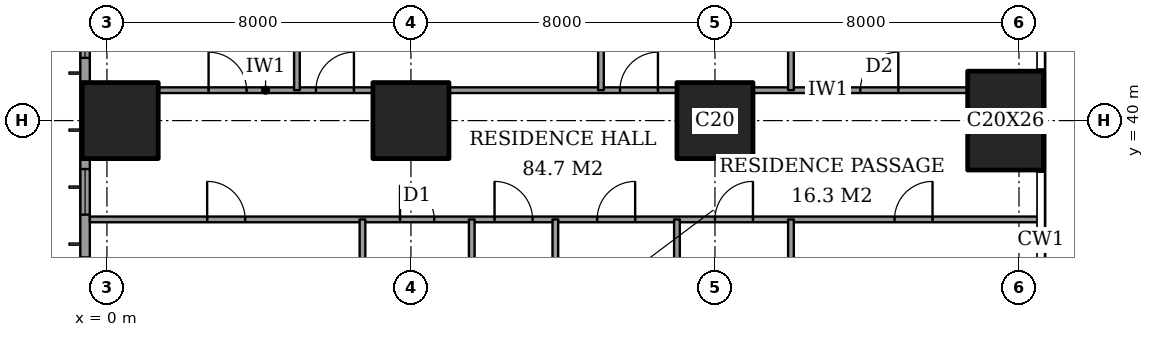
"""IFC4 building model, lengths in metres.
Left out: names, types, materials, properties, quantities, classifications, styles, units other than length and angle.
Written with IfcOpenShell. Run it as: python <this file> out.ifc"""

import sys

from ifc_helpers import new_model, si_unit, direction, frame, frame_2d, origin, origin_2d, place, context, subcontext, project, spatial, rectangle, extrude, element, fill, save


model = new_model("IFC4")
c1 = context("Model", 3, precision=1e-05, world=origin(), true_north=direction((0.0, 1.0)))
c2 = subcontext(c1, "Body", "Model", "MODEL_VIEW")
j1 = project(units=[si_unit("LENGTHUNIT", "METRE"), si_unit("PLANEANGLEUNIT", "RADIAN")], contexts=[c1])
p1 = place(None, origin())
s1 = spatial("IfcSite", under=j1, at=p1, CompositionType="ELEMENT")
p2 = place(p1, origin())
s2 = spatial("IfcBuilding", under=s1, at=p2, CompositionType="ELEMENT")
p3 = place(p2, frame((0.0, 0.0, 44.0)))
s3 = spatial("IfcBuildingStorey", under=s2, at=p3, CompositionType="ELEMENT", Elevation=44.0)
for number, where, z_axis, x_axis in (
    (1, (0.35, 40.0, 0.0), (0.0, 0.0, 1.0), (1.0, 0.0, 0.0)),
    (2, (8.0, 40.0, 0.0), (0.0, 0.0, 1.0), (1.0, 0.0, 0.0)),
    (3, (16.0, 40.0, 0.0), (0.0, 0.0, 1.0), (1.0, 0.0, 0.0)),
):
    element("IfcColumn", number, at=place(p3, frame(where, z_axis=z_axis, x_axis=x_axis)), inside=s3, PredefinedType="COLUMN", context=c2, shape_type="SweptSolid", body=[
        extrude(rectangle(XDim=2.0, YDim=2.0, at=origin_2d()), origin(), (0.0, 0.0, 1.0), 3.6),
    ])
p4 = place(p3, frame((23.65, 40.0, 0.0), z_axis=(0.0, 0.0, 1.0), x_axis=(1.0, 0.0, 0.0)))
e4 = element("IfcColumn", 4, at=p4, inside=s3, PredefinedType="COLUMN", context=c2, shape_type="SweptSolid", body=[
    extrude(rectangle(XDim=2.0, YDim=2.6, at=origin_2d()), origin(), (0.0, 0.0, 1.0), 3.6),
])
p5 = place(p3, frame((-0.575, 44.825, 0.0), z_axis=(0.0, 0.0, 1.0), x_axis=(0.0, -1.0, 0.0)))
e5 = element("IfcWall", 5, at=p5, inside=s3, PredefinedType="SOLIDWALL", context=c2, shape_type="SweptSolid", body=[
    extrude(rectangle(XDim=41.65, YDim=0.25, at=frame_2d((20.825, 0.0))), origin(), (0.0, 0.0, 1.0), 3.6),
])
p6 = place(p5, frame((0.775, 0.0, 0.6)))
e6 = element("IfcOpeningElement", 6, at=p6, cuts=e5, PredefinedType="OPENING", context=c2, shape_type="SweptSolid", body=[
    extrude(rectangle(XDim=2.4, YDim=2.0, at=frame_2d((1.2, 1.0))), frame((0.0, 0.135, 0.0), z_axis=(0.0, -1.0, 0.0), x_axis=(1.0, 0.0, 0.0)), (0.0, 0.0, 1.0), 0.27),
])
p7 = place(p5, frame((6.1, 0.0, 0.6)))
e7 = element("IfcOpeningElement", 7, at=p7, cuts=e5, PredefinedType="OPENING", context=c2, shape_type="SweptSolid", body=[
    extrude(rectangle(XDim=1.2, YDim=2.0, at=frame_2d((0.6, 1.0))), frame((0.0, 0.135, 0.0), z_axis=(0.0, -1.0, 0.0), x_axis=(1.0, 0.0, 0.0)), (0.0, 0.0, 1.0), 0.27),
])
p8 = place(p5, frame((8.425, 0.0, 0.6)))
e8 = element("IfcOpeningElement", 8, at=p8, cuts=e5, PredefinedType="OPENING", context=c2, shape_type="SweptSolid", body=[
    extrude(rectangle(XDim=2.4, YDim=2.0, at=frame_2d((1.2, 1.0))), frame((0.0, 0.135, 0.0), z_axis=(0.0, -1.0, 0.0), x_axis=(1.0, 0.0, 0.0)), (0.0, 0.0, 1.0), 0.27),
])
p9 = place(p5, frame((15.625, 0.0, 0.6)))
e9 = element("IfcOpeningElement", 9, at=p9, cuts=e5, PredefinedType="OPENING", context=c2, shape_type="SweptSolid", body=[
    extrude(rectangle(XDim=2.4, YDim=2.0, at=frame_2d((1.2, 1.0))), frame((0.0, 0.135, 0.0), z_axis=(0.0, -1.0, 0.0), x_axis=(1.0, 0.0, 0.0)), (0.0, 0.0, 1.0), 0.27),
])
p10 = place(p5, frame((23.625, 0.0, 0.6)))
e10 = element("IfcOpeningElement", 10, at=p10, cuts=e5, PredefinedType="OPENING", context=c2, shape_type="SweptSolid", body=[
    extrude(rectangle(XDim=2.4, YDim=2.0, at=frame_2d((1.2, 1.0))), frame((0.0, 0.135, 0.0), z_axis=(0.0, -1.0, 0.0), x_axis=(1.0, 0.0, 0.0)), (0.0, 0.0, 1.0), 0.27),
])
p11 = place(p5, frame((30.825, 0.0, 0.6)))
e11 = element("IfcOpeningElement", 11, at=p11, cuts=e5, PredefinedType="OPENING", context=c2, shape_type="SweptSolid", body=[
    extrude(rectangle(XDim=2.4, YDim=2.0, at=frame_2d((1.2, 1.0))), frame((0.0, 0.135, 0.0), z_axis=(0.0, -1.0, 0.0), x_axis=(1.0, 0.0, 0.0)), (0.0, 0.0, 1.0), 0.27),
])
p12 = place(p5, frame((34.5, 0.0, 0.6)))
e12 = element("IfcOpeningElement", 12, at=p12, cuts=e5, PredefinedType="OPENING", context=c2, shape_type="SweptSolid", body=[
    extrude(rectangle(XDim=1.2, YDim=2.0, at=frame_2d((0.6, 1.0))), frame((0.0, 0.135, 0.0), z_axis=(0.0, -1.0, 0.0), x_axis=(1.0, 0.0, 0.0)), (0.0, 0.0, 1.0), 0.27),
])
p13 = place(p5, frame((38.475, 0.0, 0.6)))
e13 = element("IfcOpeningElement", 13, at=p13, cuts=e5, PredefinedType="OPENING", context=c2, shape_type="SweptSolid", body=[
    extrude(rectangle(XDim=2.4, YDim=2.0, at=frame_2d((1.2, 1.0))), frame((0.0, 0.135, 0.0), z_axis=(0.0, -1.0, 0.0), x_axis=(1.0, 0.0, 0.0)), (0.0, 0.0, 1.0), 0.27),
])
p14 = place(p3, frame((-0.45, 37.4, 0.0), z_axis=(0.0, 0.0, 1.0), x_axis=(1.0, 0.0, 0.0)))
e14 = element("IfcWall", 14, at=p14, inside=s3, PredefinedType="PARTITIONING", context=c2, shape_type="SweptSolid", body=[
    extrude(rectangle(XDim=25.011, YDim=0.15, at=frame_2d((12.505, 0.0))), origin(), (0.0, 0.0, 1.0), 3.35),
])
p15 = place(p14, frame((10.65, 0.0, 0.0)))
e15 = element("IfcOpeningElement", 15, at=p15, cuts=e14, PredefinedType="OPENING", context=c2, shape_type="SweptSolid", body=[
    extrude(rectangle(XDim=1.0, YDim=2.1, at=frame_2d((0.5, 1.05))), frame((0.0, 0.085, 0.0), z_axis=(0.0, -1.0, 0.0), x_axis=(1.0, 0.0, 0.0)), (0.0, 0.0, 1.0), 0.17),
])
p16 = place(p14, frame((3.087, 0.0, 0.0)))
e16 = element("IfcOpeningElement", 16, at=p16, cuts=e14, PredefinedType="OPENING", context=c2, shape_type="SweptSolid", body=[
    extrude(rectangle(XDim=1.0, YDim=2.1, at=frame_2d((0.5, 1.05))), frame((0.0, 0.085, 0.0), z_axis=(0.0, -1.0, 0.0), x_axis=(1.0, 0.0, 0.0)), (0.0, 0.0, 1.0), 0.17),
])
p17 = place(p14, frame((8.163, 0.0, 0.0)))
e17 = element("IfcOpeningElement", 17, at=p17, cuts=e14, PredefinedType="OPENING", context=c2, shape_type="SweptSolid", body=[
    extrude(rectangle(XDim=0.9, YDim=2.1, at=frame_2d((0.45, 1.05))), frame((0.0, 0.085, 0.0), z_axis=(0.0, -1.0, 0.0), x_axis=(1.0, 0.0, 0.0)), (0.0, 0.0, 1.0), 0.17),
])
p18 = place(p14, frame((13.35, 0.0, 0.0)))
e18 = element("IfcOpeningElement", 18, at=p18, cuts=e14, PredefinedType="OPENING", context=c2, shape_type="SweptSolid", body=[
    extrude(rectangle(XDim=1.0, YDim=2.1, at=frame_2d((0.5, 1.05))), frame((0.0, 0.085, 0.0), z_axis=(0.0, -1.0, 0.0), x_axis=(1.0, 0.0, 0.0)), (0.0, 0.0, 1.0), 0.17),
])
p19 = place(p14, frame((16.45, 0.0, 0.0)))
e19 = element("IfcOpeningElement", 19, at=p19, cuts=e14, PredefinedType="OPENING", context=c2, shape_type="SweptSolid", body=[
    extrude(rectangle(XDim=1.0, YDim=2.1, at=frame_2d((0.5, 1.05))), frame((0.0, 0.085, 0.0), z_axis=(0.0, -1.0, 0.0), x_axis=(1.0, 0.0, 0.0)), (0.0, 0.0, 1.0), 0.17),
])
p20 = place(p14, frame((21.175, 0.0, 0.0)))
e20 = element("IfcOpeningElement", 20, at=p20, cuts=e14, PredefinedType="OPENING", context=c2, shape_type="SweptSolid", body=[
    extrude(rectangle(XDim=1.0, YDim=2.1, at=frame_2d((0.5, 1.05))), frame((0.0, 0.085, 0.0), z_axis=(0.0, -1.0, 0.0), x_axis=(1.0, 0.0, 0.0)), (0.0, 0.0, 1.0), 0.17),
])
p21 = place(p3, frame((1.35, 40.8, 0.0), z_axis=(0.0, 0.0, 1.0), x_axis=(1.0, 0.0, 0.0)))
e21 = element("IfcWall", 21, at=p21, inside=s3, PredefinedType="PARTITIONING", context=c2, shape_type="SweptSolid", body=[
    extrude(rectangle(XDim=5.65, YDim=0.15, at=frame_2d((2.825, 0.0))), origin(), (0.0, 0.0, 1.0), 3.35),
])
p22 = place(p21, frame((1.325, 0.0, 0.0)))
e22 = element("IfcOpeningElement", 22, at=p22, cuts=e21, PredefinedType="OPENING", context=c2, shape_type="SweptSolid", body=[
    extrude(rectangle(XDim=1.0, YDim=2.1, at=frame_2d((0.5, 1.05))), frame((0.0, 0.085, 0.0), z_axis=(0.0, -1.0, 0.0), x_axis=(1.0, 0.0, 0.0)), (0.0, 0.0, 1.0), 0.17),
])
p23 = place(p21, frame((4.15, 0.0, 0.0)))
e23 = element("IfcOpeningElement", 23, at=p23, cuts=e21, PredefinedType="OPENING", context=c2, shape_type="SweptSolid", body=[
    extrude(rectangle(XDim=1.0, YDim=2.1, at=frame_2d((0.5, 1.05))), frame((0.0, 0.085, 0.0), z_axis=(0.0, -1.0, 0.0), x_axis=(1.0, 0.0, 0.0)), (0.0, 0.0, 1.0), 0.17),
])
p24 = place(p3, frame((9.0, 40.8, 0.0), z_axis=(0.0, 0.0, 1.0), x_axis=(1.0, 0.0, 0.0)))
e24 = element("IfcWall", 24, at=p24, inside=s3, PredefinedType="PARTITIONING", context=c2, shape_type="SweptSolid", body=[
    extrude(rectangle(XDim=6.0, YDim=0.15, at=frame_2d((3.0, 0.0))), origin(), (0.0, 0.0, 1.0), 3.35),
])
p25 = place(p24, frame((4.5, 0.0, 0.0)))
e25 = element("IfcOpeningElement", 25, at=p25, cuts=e24, PredefinedType="OPENING", context=c2, shape_type="SweptSolid", body=[
    extrude(rectangle(XDim=1.0, YDim=2.1, at=frame_2d((0.5, 1.05))), frame((0.0, 0.085, 0.0), z_axis=(0.0, -1.0, 0.0), x_axis=(1.0, 0.0, 0.0)), (0.0, 0.0, 1.0), 0.17),
])
p26 = place(p3, frame((17.0, 40.8, 0.0), z_axis=(0.0, 0.0, 1.0), x_axis=(1.0, 0.0, 0.0)))
e26 = element("IfcWall", 26, at=p26, inside=s3, PredefinedType="PARTITIONING", context=c2, shape_type="SweptSolid", body=[
    extrude(rectangle(XDim=5.65, YDim=0.15, at=frame_2d((2.825, 0.0))), origin(), (0.0, 0.0, 1.0), 3.35),
])
p27 = place(p26, frame((2.825, 0.0, 0.0)))
e27 = element("IfcOpeningElement", 27, at=p27, cuts=e26, PredefinedType="OPENING", context=c2, shape_type="SweptSolid", body=[
    extrude(rectangle(XDim=1.0, YDim=2.1, at=frame_2d((0.5, 1.05))), frame((0.0, 0.085, 0.0), z_axis=(0.0, -1.0, 0.0), x_axis=(1.0, 0.0, 0.0)), (0.0, 0.0, 1.0), 0.17),
])
p28 = place(p3, frame((5.0, 40.8, 0.0), z_axis=(0.0, 0.0, 1.0), x_axis=(0.0, 1.0, 0.0)))
e28 = element("IfcWall", 28, at=p28, inside=s3, PredefinedType="PARTITIONING", context=c2, shape_type="SweptSolid", body=[
    extrude(rectangle(XDim=7.65, YDim=0.15, at=frame_2d((3.825, 0.0))), origin(), (0.0, 0.0, 1.0), 3.35),
])
p29 = place(p3, frame((6.725, 33.2, 0.0), z_axis=(0.0, 0.0, 1.0), x_axis=(0.0, 1.0, 0.0)))
e29 = element("IfcWall", 29, at=p29, inside=s3, PredefinedType="PARTITIONING", context=c2, shape_type="SweptSolid", body=[
    extrude(rectangle(XDim=4.2, YDim=0.15, at=frame_2d((2.1, 0.0))), origin(), (0.0, 0.0, 1.0), 3.35),
])
p30 = place(p3, frame((9.6, 28.0, 0.0), z_axis=(0.0, 0.0, 1.0), x_axis=(0.0, 1.0, 0.0)))
e30 = element("IfcWall", 30, at=p30, inside=s3, PredefinedType="PARTITIONING", context=c2, shape_type="SweptSolid", body=[
    extrude(rectangle(XDim=9.4, YDim=0.15, at=frame_2d((4.7, 0.0))), origin(), (0.0, 0.0, 1.0), 3.35),
])
p31 = place(p30, frame((0.5, 0.0, 0.0)))
e31 = element("IfcOpeningElement", 31, at=p31, cuts=e30, PredefinedType="OPENING", context=c2, shape_type="SweptSolid", body=[
    extrude(rectangle(XDim=1.0, YDim=2.1, at=frame_2d((0.5, 1.05))), frame((0.0, 0.085, 0.0), z_axis=(0.0, -1.0, 0.0), x_axis=(1.0, 0.0, 0.0)), (0.0, 0.0, 1.0), 0.17),
])
p32 = place(p3, frame((11.8, 30.0, 0.0), z_axis=(0.0, 0.0, 1.0), x_axis=(0.0, 1.0, 0.0)))
e32 = element("IfcWall", 32, at=p32, inside=s3, PredefinedType="PARTITIONING", context=c2, shape_type="SweptSolid", body=[
    extrude(rectangle(XDim=7.4, YDim=0.15, at=frame_2d((3.7, 0.0))), origin(), (0.0, 0.0, 1.0), 3.35),
])
p33 = place(p3, frame((13.0, 40.8, 0.0), z_axis=(0.0, 0.0, 1.0), x_axis=(0.0, 1.0, 0.0)))
e33 = element("IfcWall", 33, at=p33, inside=s3, PredefinedType="PARTITIONING", context=c2, shape_type="SweptSolid", body=[
    extrude(rectangle(XDim=7.65, YDim=0.15, at=frame_2d((3.825, 0.0))), origin(), (0.0, 0.0, 1.0), 3.35),
])
p34 = place(p3, frame((15.0, 33.2, 0.0), z_axis=(0.0, 0.0, 1.0), x_axis=(0.0, 1.0, 0.0)))
e34 = element("IfcWall", 34, at=p34, inside=s3, PredefinedType="PARTITIONING", context=c2, shape_type="SweptSolid", body=[
    extrude(rectangle(XDim=4.2, YDim=0.15, at=frame_2d((2.1, 0.0))), origin(), (0.0, 0.0, 1.0), 3.35),
])
p35 = place(p3, frame((18.0, 31.1, 0.0), z_axis=(0.0, 0.0, 1.0), x_axis=(0.0, 1.0, 0.0)))
e35 = element("IfcWall", 35, at=p35, inside=s3, PredefinedType="PARTITIONING", context=c2, shape_type="SweptSolid", body=[
    extrude(rectangle(XDim=6.3, YDim=0.15, at=frame_2d((3.15, 0.0))), origin(), (0.0, 0.0, 1.0), 3.35),
])
p36 = place(p3, frame((18.0, 40.8, 0.0), z_axis=(0.0, 0.0, 1.0), x_axis=(0.0, 1.0, 0.0)))
e36 = element("IfcWall", 36, at=p36, inside=s3, PredefinedType="PARTITIONING", context=c2, shape_type="SweptSolid", body=[
    extrude(rectangle(XDim=7.65, YDim=0.15, at=frame_2d((3.825, 0.0))), origin(), (0.0, 0.0, 1.0), 3.35),
])
p37 = place(p6, origin())
e37 = element("IfcWindow", 37, at=p37, inside=s3, PartitioningType="SINGLE_PANEL", PredefinedType="WINDOW", context=c2, shape_type="SweptSolid", body=[
    extrude(rectangle(XDim=2.4, YDim=2.0, at=frame_2d((1.2, 1.0))), frame((0.0, 0.03, 0.0), z_axis=(0.0, -1.0, 0.0), x_axis=(1.0, 0.0, 0.0)), (0.0, 0.0, 1.0), 0.06),
])
fill(e6, e37)
p38 = place(p7, origin())
e38 = element("IfcWindow", 38, at=p38, inside=s3, PartitioningType="SINGLE_PANEL", PredefinedType="WINDOW", context=c2, shape_type="SweptSolid", body=[
    extrude(rectangle(XDim=1.2, YDim=2.0, at=frame_2d((0.6, 1.0))), frame((0.0, 0.03, 0.0), z_axis=(0.0, -1.0, 0.0), x_axis=(1.0, 0.0, 0.0)), (0.0, 0.0, 1.0), 0.06),
])
fill(e7, e38)
p39 = place(p22, origin())
e39 = element("IfcDoor", 39, at=p39, inside=s3, OperationType="SINGLE_SWING_RIGHT", PredefinedType="DOOR", context=c2, shape_type="SweptSolid", body=[
    extrude(rectangle(XDim=1.0, YDim=2.1, at=frame_2d((0.5, 1.05))), frame((0.0, 0.025, 0.0), z_axis=(0.0, -1.0, 0.0), x_axis=(1.0, 0.0, 0.0)), (0.0, 0.0, 1.0), 0.05),
])
fill(e22, e39)
p40 = place(p23, origin())
e40 = element("IfcDoor", 40, at=p40, inside=s3, OperationType="SINGLE_SWING_LEFT", PredefinedType="DOOR", context=c2, shape_type="SweptSolid", body=[
    extrude(rectangle(XDim=1.0, YDim=2.1, at=frame_2d((0.5, 1.05))), frame((0.0, 0.025, 0.0), z_axis=(0.0, -1.0, 0.0), x_axis=(1.0, 0.0, 0.0)), (0.0, 0.0, 1.0), 0.05),
])
fill(e23, e40)
p41 = place(p25, origin())
e41 = element("IfcDoor", 41, at=p41, inside=s3, OperationType="SINGLE_SWING_LEFT", PredefinedType="DOOR", context=c2, shape_type="SweptSolid", body=[
    extrude(rectangle(XDim=1.0, YDim=2.1, at=frame_2d((0.5, 1.05))), frame((0.0, 0.025, 0.0), z_axis=(0.0, -1.0, 0.0), x_axis=(1.0, 0.0, 0.0)), (0.0, 0.0, 1.0), 0.05),
])
fill(e25, e41)
p42 = place(p27, origin())
e42 = element("IfcDoor", 42, at=p42, inside=s3, OperationType="SINGLE_SWING_LEFT", PredefinedType="DOOR", context=c2, shape_type="SweptSolid", body=[
    extrude(rectangle(XDim=1.0, YDim=2.1, at=frame_2d((0.5, 1.05))), frame((0.0, 0.025, 0.0), z_axis=(0.0, -1.0, 0.0), x_axis=(1.0, 0.0, 0.0)), (0.0, 0.0, 1.0), 0.05),
])
fill(e27, e42)
p43 = place(p15, origin())
e43 = element("IfcDoor", 43, at=p43, inside=s3, OperationType="SINGLE_SWING_RIGHT", PredefinedType="DOOR", context=c2, shape_type="SweptSolid", body=[
    extrude(rectangle(XDim=1.0, YDim=2.1, at=frame_2d((0.5, 1.05))), frame((0.0, 0.025, 0.0), z_axis=(0.0, -1.0, 0.0), x_axis=(1.0, 0.0, 0.0)), (0.0, 0.0, 1.0), 0.05),
])
fill(e15, e43)
p44 = place(p16, origin())
e44 = element("IfcDoor", 44, at=p44, inside=s3, OperationType="SINGLE_SWING_RIGHT", PredefinedType="DOOR", context=c2, shape_type="SweptSolid", body=[
    extrude(rectangle(XDim=1.0, YDim=2.1, at=frame_2d((0.5, 1.05))), frame((0.0, 0.025, 0.0), z_axis=(0.0, -1.0, 0.0), x_axis=(1.0, 0.0, 0.0)), (0.0, 0.0, 1.0), 0.05),
])
fill(e16, e44)
p45 = place(p17, origin())
e45 = element("IfcDoor", 45, at=p45, inside=s3, OperationType="SINGLE_SWING_RIGHT", PredefinedType="DOOR", context=c2, shape_type="SweptSolid", body=[
    extrude(rectangle(XDim=0.9, YDim=2.1, at=frame_2d((0.45, 1.05))), frame((0.0, 0.025, 0.0), z_axis=(0.0, -1.0, 0.0), x_axis=(1.0, 0.0, 0.0)), (0.0, 0.0, 1.0), 0.05),
])
fill(e17, e45)
p46 = place(p18, origin())
e46 = element("IfcDoor", 46, at=p46, inside=s3, OperationType="SINGLE_SWING_LEFT", PredefinedType="DOOR", context=c2, shape_type="SweptSolid", body=[
    extrude(rectangle(XDim=1.0, YDim=2.1, at=frame_2d((0.5, 1.05))), frame((0.0, 0.025, 0.0), z_axis=(0.0, -1.0, 0.0), x_axis=(1.0, 0.0, 0.0)), (0.0, 0.0, 1.0), 0.05),
])
fill(e18, e46)
p47 = place(p19, origin())
e47 = element("IfcDoor", 47, at=p47, inside=s3, OperationType="SINGLE_SWING_LEFT", PredefinedType="DOOR", context=c2, shape_type="SweptSolid", body=[
    extrude(rectangle(XDim=1.0, YDim=2.1, at=frame_2d((0.5, 1.05))), frame((0.0, 0.025, 0.0), z_axis=(0.0, -1.0, 0.0), x_axis=(1.0, 0.0, 0.0)), (0.0, 0.0, 1.0), 0.05),
])
fill(e19, e47)
p48 = place(p20, origin())
e48 = element("IfcDoor", 48, at=p48, inside=s3, OperationType="SINGLE_SWING_LEFT", PredefinedType="DOOR", context=c2, shape_type="SweptSolid", body=[
    extrude(rectangle(XDim=1.0, YDim=2.1, at=frame_2d((0.5, 1.05))), frame((0.0, 0.025, 0.0), z_axis=(0.0, -1.0, 0.0), x_axis=(1.0, 0.0, 0.0)), (0.0, 0.0, 1.0), 0.05),
])
fill(e20, e48)
save(model, sys.argv[1])
